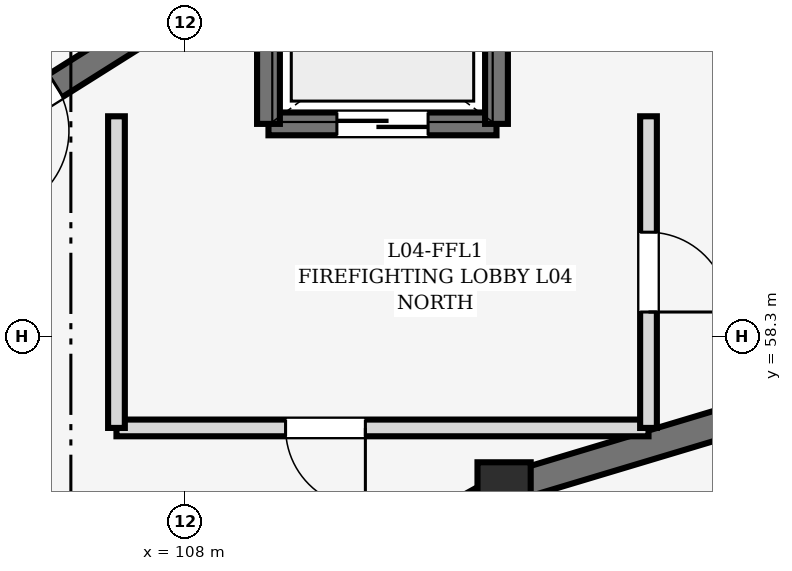
"""IFC4 building model, lengths in metres.
Left out: names, types, materials, properties, quantities, classifications, styles, units other than length and angle.
Written with IfcOpenShell. Run it as: python <this file> out.ifc"""

import sys

from ifc_helpers import new_model, si_unit, direction, frame, frame_2d, origin, origin_2d, place, context, subcontext, project, spatial, rectangle, extrude, element, fill, save


model = new_model("IFC4")
c1 = context("Model", 3, precision=1e-05, world=origin(), true_north=direction((0.0, 1.0)))
c2 = subcontext(c1, "Body", "Model", "MODEL_VIEW")
j1 = project(units=[si_unit("LENGTHUNIT", "METRE"), si_unit("PLANEANGLEUNIT", "RADIAN")], contexts=[c1])
p1 = place(None, origin())
s1 = spatial("IfcSite", under=j1, at=p1, CompositionType="ELEMENT")
p2 = place(p1, origin())
s2 = spatial("IfcBuilding", under=s1, at=p2, CompositionType="ELEMENT")
p3 = place(p2, frame((0.0, 0.0, 14.7)))
s3 = spatial("IfcBuildingStorey", under=s2, at=p3, CompositionType="ELEMENT", Elevation=14.7)
p4 = place(p3, frame((112.2, 56.298, 0.0), z_axis=(0.0, 0.0, 1.0), x_axis=(1.0, 0.0, 0.0)))
e1 = element("IfcColumn", 1, at=p4, inside=s3, PredefinedType="COLUMN", context=c2, shape_type="SweptSolid", body=[
    extrude(rectangle(XDim=0.7, YDim=0.7, at=origin_2d()), origin(), (0.0, 0.0, 1.0), 4.5),
])
p5 = place(p3, frame((116.654, 57.634, 0.0), z_axis=(0.0, 0.0, 1.0), x_axis=(-0.957792414988, -0.287460762177, 0.0)))
e2 = element("IfcWall", 2, at=p5, inside=s3, PredefinedType="SOLIDWALL", context=c2, shape_type="SweptSolid", body=[
    extrude(rectangle(XDim=4.365, YDim=0.38, at=frame_2d((2.183, 0.0))), origin(), (0.0, 0.0, 1.0), 4.25),
])
p6 = place(p3, frame((111.951, 56.159, 0.0), z_axis=(0.0, 0.0, 1.0), x_axis=(-0.87401308715, -0.485902380618, 0.0)))
e3 = element("IfcWall", 3, at=p6, inside=s3, PredefinedType="SOLIDWALL", context=c2, shape_type="SweptSolid", body=[
    extrude(rectangle(XDim=4.074, YDim=0.38, at=frame_2d((2.037, 0.0))), origin(), (0.0, 0.0, 1.0), 4.25),
])
p7 = place(p6, frame((1.507, 0.0, 0.0)))
e4 = element("IfcOpeningElement", 4, at=p7, cuts=e3, PredefinedType="OPENING", context=c2, shape_type="SweptSolid", body=[
    extrude(rectangle(XDim=1.06, YDim=2.24, at=frame_2d((0.53, 1.12))), frame((0.0, 0.202, 0.0), z_axis=(0.0, -1.0, 0.0), x_axis=(1.0, 0.0, 0.0)), (0.0, 0.0, 1.0), 0.404),
])
p8 = place(p3, frame((108.346, 62.893, 0.0), z_axis=(0.0, 0.0, 1.0), x_axis=(-0.846132783073, -0.532972150688, 0.0)))
e5 = element("IfcWall", 5, at=p8, inside=s3, PredefinedType="SHEAR", context=c2, shape_type="SweptSolid", body=[
    extrude(rectangle(XDim=5.95, YDim=0.35, at=frame_2d((2.975, 0.0))), origin(), (0.0, 0.0, 1.0), 4.25),
])
p9 = place(p8, frame((2.415, 0.0, 0.0)))
e6 = element("IfcOpeningElement", 6, at=p9, cuts=e5, PredefinedType="OPENING", context=c2, shape_type="SweptSolid", body=[
    extrude(rectangle(XDim=1.12, YDim=2.26, at=frame_2d((0.56, 1.13))), frame((0.0, 0.187, 0.0), z_axis=(0.0, -1.0, 0.0), x_axis=(1.0, 0.0, 0.0)), (0.0, 0.0, 1.0), 0.374),
])
p10 = place(p3, frame((112.1, 61.1, 0.0), z_axis=(0.0, 0.0, 1.0), x_axis=(-1.0, 0.0, 0.0)))
e7 = element("IfcWall", 7, at=p10, inside=s3, PredefinedType="SHEAR", context=c2, shape_type="SweptSolid", body=[
    extrude(rectangle(XDim=3.0, YDim=0.3, at=frame_2d((1.5, 0.0))), origin(), (0.0, 0.0, 1.0), 4.25),
])
p11 = place(p10, frame((0.9, 0.0, 0.0)))
e8 = element("IfcOpeningElement", 8, at=p11, cuts=e7, PredefinedType="OPENING", context=c2, shape_type="SweptSolid", body=[
    extrude(rectangle(XDim=1.2, YDim=2.15, at=frame_2d((0.6, 1.075))), frame((0.0, 0.162, 0.0), z_axis=(0.0, -1.0, 0.0), x_axis=(1.0, 0.0, 0.0)), (0.0, 0.0, 1.0), 0.324),
])
for number, where, z_axis, x_axis in (
    (9, (112.1, 63.3, 0.0), (0.0, 0.0, 1.0), (0.0, -1.0, 0.0)),
    (10, (109.1, 61.1, 0.0), (0.0, 0.0, 1.0), (0.0, 1.0, 0.0)),
):
    element("IfcWall", number, at=place(p3, frame(where, z_axis=z_axis, x_axis=x_axis)), inside=s3, PredefinedType="SHEAR", context=c2, shape_type="SweptSolid", body=[
        extrude(rectangle(XDim=2.2, YDim=0.3, at=frame_2d((1.1, 0.0))), origin(), (0.0, 0.0, 1.0), 4.25),
    ])
p12 = place(p3, frame((114.1, 57.1, 0.0), z_axis=(0.0, 0.0, 1.0), x_axis=(-1.0, 0.0, 0.0)))
e11 = element("IfcWall", 11, at=p12, inside=s3, PredefinedType="SOLIDWALL", context=c2, shape_type="SweptSolid", body=[
    extrude(rectangle(XDim=7.0, YDim=0.22, at=frame_2d((3.5, 0.0))), origin(), (0.0, 0.0, 1.0), 4.235),
])
p13 = place(p12, frame((3.725, 0.0, 0.0)))
e12 = element("IfcOpeningElement", 12, at=p13, cuts=e11, PredefinedType="OPENING", context=c2, shape_type="SweptSolid", body=[
    extrude(rectangle(XDim=1.05, YDim=2.15, at=frame_2d((0.525, 1.075))), frame((0.0, 0.122, 0.0), z_axis=(0.0, -1.0, 0.0), x_axis=(1.0, 0.0, 0.0)), (0.0, 0.0, 1.0), 0.244),
])
p14 = place(p3, frame((107.1, 57.1, 0.0), z_axis=(0.0, 0.0, 1.0), x_axis=(0.0, 1.0, 0.0)))
e13 = element("IfcWall", 13, at=p14, inside=s3, PredefinedType="SOLIDWALL", context=c2, shape_type="SweptSolid", body=[
    extrude(rectangle(XDim=4.1, YDim=0.22, at=frame_2d((2.05, 0.0))), origin(), (0.0, 0.0, 1.0), 4.235),
])
p15 = place(p3, frame((114.1, 61.2, 0.0), z_axis=(0.0, 0.0, 1.0), x_axis=(0.0, -1.0, 0.0)))
e14 = element("IfcWall", 14, at=p15, inside=s3, PredefinedType="SOLIDWALL", context=c2, shape_type="SweptSolid", body=[
    extrude(rectangle(XDim=4.1, YDim=0.22, at=frame_2d((2.05, 0.0))), origin(), (0.0, 0.0, 1.0), 4.235),
])
p16 = place(p15, frame((1.525, 0.0, 0.0)))
e15 = element("IfcOpeningElement", 15, at=p16, cuts=e14, PredefinedType="OPENING", context=c2, shape_type="SweptSolid", body=[
    extrude(rectangle(XDim=1.05, YDim=2.15, at=frame_2d((0.525, 1.075))), frame((0.0, 0.122, 0.0), z_axis=(0.0, -1.0, 0.0), x_axis=(1.0, 0.0, 0.0)), (0.0, 0.0, 1.0), 0.244),
])
p17 = place(p11, origin())
e16 = element("IfcDoor", 16, at=p17, inside=s3, OperationType="DOUBLE_DOOR_SLIDING", PredefinedType="DOOR", context=c2, shape_type="SweptSolid", body=[
    extrude(rectangle(XDim=1.2, YDim=2.15, at=frame_2d((0.6, 1.075))), frame((0.0, 0.025, 0.0), z_axis=(0.0, -1.0, 0.0), x_axis=(1.0, 0.0, 0.0)), (0.0, 0.0, 1.0), 0.05),
])
fill(e8, e16)
p18 = place(p13, origin())
e17 = element("IfcDoor", 17, at=p18, inside=s3, OperationType="SINGLE_SWING_LEFT", PredefinedType="DOOR", context=c2, shape_type="SweptSolid", body=[
    extrude(rectangle(XDim=1.05, YDim=2.15, at=frame_2d((0.525, 1.075))), frame((0.0, 0.025, 0.0), z_axis=(0.0, -1.0, 0.0), x_axis=(1.0, 0.0, 0.0)), (0.0, 0.0, 1.0), 0.05),
])
fill(e12, e17)
p19 = place(p16, origin())
e18 = element("IfcDoor", 18, at=p19, inside=s3, OperationType="SINGLE_SWING_RIGHT", PredefinedType="DOOR", context=c2, shape_type="SweptSolid", body=[
    extrude(rectangle(XDim=1.05, YDim=2.15, at=frame_2d((0.525, 1.075))), frame((0.0, 0.025, 0.0), z_axis=(0.0, -1.0, 0.0), x_axis=(1.0, 0.0, 0.0)), (0.0, 0.0, 1.0), 0.05),
])
fill(e15, e18)
p20 = place(p9, origin())
e19 = element("IfcDoor", 19, at=p20, inside=s3, OperationType="SINGLE_SWING_RIGHT", PredefinedType="DOOR", context=c2, shape_type="SweptSolid", body=[
    extrude(rectangle(XDim=1.12, YDim=2.26, at=frame_2d((0.56, 1.13))), frame((0.0, 0.025, 0.0), z_axis=(0.0, -1.0, 0.0), x_axis=(1.0, 0.0, 0.0)), (0.0, 0.0, 1.0), 0.05),
])
fill(e6, e19)
save(model, sys.argv[1])
